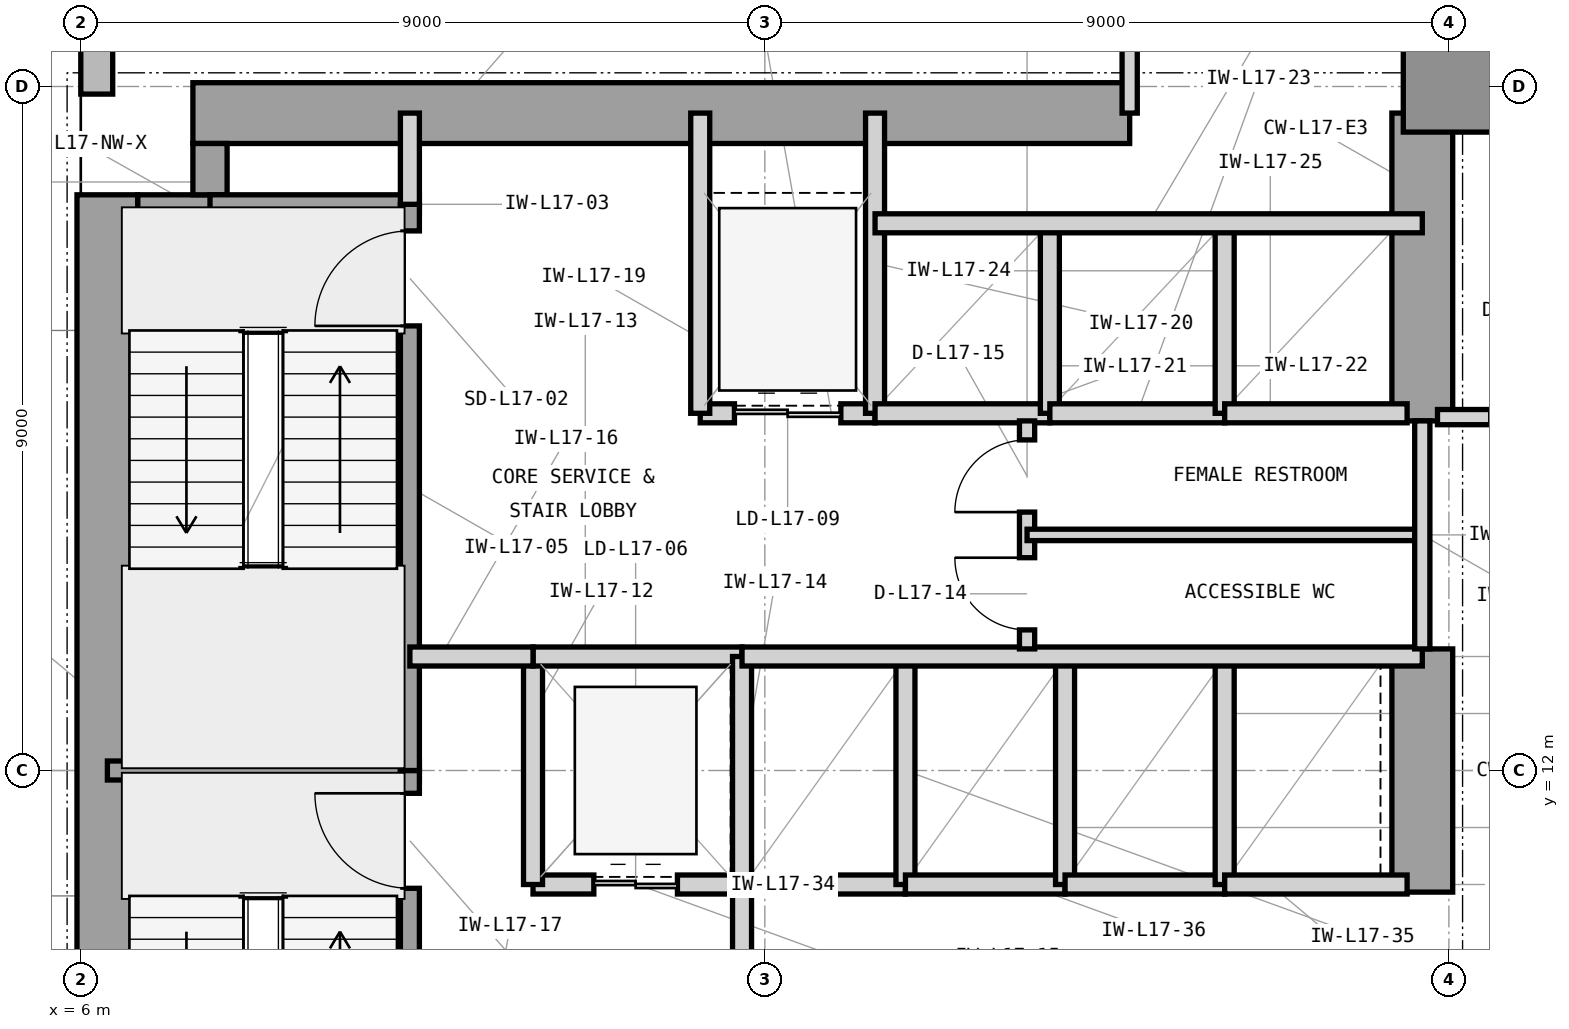
"""IFC4 building model, lengths in metres.
Left out: names, types, materials, properties, quantities, classifications, styles, units other than length and angle.
Written with IfcOpenShell. Run it as: python <this file> out.ifc"""

import sys

from ifc_helpers import new_model, si_unit, direction, frame, frame_2d, origin, origin_2d, place, context, subcontext, project, spatial, rectangle, extrude, element, fill, save


model = new_model("IFC4")
c1 = context("Model", 3, precision=1e-05, world=origin(), true_north=direction((0.0, 1.0)))
c2 = subcontext(c1, "Body", "Model", "MODEL_VIEW")
j1 = project(units=[si_unit("LENGTHUNIT", "METRE"), si_unit("PLANEANGLEUNIT", "RADIAN")], contexts=[c1])
p1 = place(None, origin())
s1 = spatial("IfcSite", under=j1, at=p1, CompositionType="ELEMENT")
p2 = place(p1, origin())
s2 = spatial("IfcBuilding", under=s1, at=p2, CompositionType="ELEMENT")
p3 = place(p2, frame((0.0, 0.0, 76.2)))
s3 = spatial("IfcBuildingStorey", under=s2, at=p3, CompositionType="ELEMENT", Elevation=76.2)
p4 = place(p3, frame((6.35, 4.425, 0.0), z_axis=(0.0, 0.0, 1.0), x_axis=(0.0, 1.0, 0.0)))
e1 = element("IfcWall", 1, at=p4, inside=s3, PredefinedType="SHEAR", context=c2, shape_type="SweptSolid", body=[
    extrude(rectangle(XDim=15.15, YDim=0.8, at=frame_2d((7.575, 0.0))), origin(), (0.0, 0.0, 1.0), 4.2),
])
p5 = place(p3, frame((7.475, 20.65, 0.0), z_axis=(0.0, 0.0, 1.0), x_axis=(1.0, 0.0, 0.0)))
e2 = element("IfcWall", 2, at=p5, inside=s3, PredefinedType="SHEAR", context=c2, shape_type="SweptSolid", body=[
    extrude(rectangle(XDim=12.325, YDim=0.8, at=frame_2d((6.163, 0.0))), origin(), (0.0, 0.0, 1.0), 4.2),
])
p6 = place(p3, frame((23.65, 10.4, 0.0), z_axis=(0.0, 0.0, 1.0), x_axis=(0.0, 1.0, 0.0)))
e3 = element("IfcWall", 3, at=p6, inside=s3, PredefinedType="SHEAR", context=c2, shape_type="SweptSolid", body=[
    extrude(rectangle(XDim=3.2, YDim=0.8, at=frame_2d((1.6, 0.0))), origin(), (0.0, 0.0, 1.0), 4.2),
])
p7 = place(p3, frame((23.65, 16.6, 0.0), z_axis=(0.0, 0.0, 1.0), x_axis=(0.0, 1.0, 0.0)))
e4 = element("IfcWall", 4, at=p7, inside=s3, PredefinedType="SHEAR", context=c2, shape_type="SweptSolid", body=[
    extrude(rectangle(XDim=4.05, YDim=0.8, at=frame_2d((2.025, 0.0))), origin(), (0.0, 0.0, 1.0), 4.2),
])
p8 = place(p3, frame((6.75, 19.35, 0.0), z_axis=(0.0, 0.0, 1.0), x_axis=(1.0, 0.0, 0.0)))
e5 = element("IfcWall", 5, at=p8, inside=s3, PredefinedType="SHEAR", context=c2, shape_type="SweptSolid", body=[
    extrude(rectangle(XDim=1.175, YDim=0.45, at=frame_2d((0.587, 0.0))), origin(), (0.0, 0.0, 1.0), 4.2),
])
p9 = place(p3, frame((7.7, 19.575, 0.0), z_axis=(0.0, 0.0, 1.0), x_axis=(0.0, 1.0, 0.0)))
e6 = element("IfcWall", 6, at=p9, inside=s3, PredefinedType="SHEAR", context=c2, shape_type="SweptSolid", body=[
    extrude(rectangle(XDim=0.675, YDim=0.45, at=frame_2d((0.337, 0.0))), origin(), (0.0, 0.0, 1.0), 4.2),
])
p10 = place(p3, frame((24.0, 21.0, 0.0), z_axis=(0.0, 0.0, 1.0), x_axis=(1.0, 0.0, 0.0)))
e7 = element("IfcColumn", 7, at=p10, inside=s3, PredefinedType="COLUMN", context=c2, shape_type="SweptSolid", body=[
    extrude(rectangle(XDim=1.2, YDim=1.2, at=origin_2d()), origin(), (0.0, 0.0, 1.0), 4.2),
])
p11 = place(p3, frame((23.79, 21.0, 0.0), z_axis=(0.0, 0.0, 1.0), x_axis=(0.0, 1.0, 0.0)))
e8 = element("IfcWall", 8, at=p11, inside=s3, PredefinedType="STANDARD", context=c2, shape_type="SweptSolid", body=[
    extrude(rectangle(XDim=28.4, YDim=0.42, at=frame_2d((14.2, 0.0))), origin(), (0.0, 0.0, 1.0), 3.98),
])
p12 = place(p11, frame((10.433, 0.0, 0.85)))
e9 = element("IfcOpeningElement", 9, at=p12, cuts=e8, PredefinedType="OPENING", context=c2, shape_type="SweptSolid", body=[
    extrude(rectangle(XDim=2.8, YDim=2.45, at=frame_2d((1.4, 1.225))), frame((0.0, 0.22, 0.0), z_axis=(0.0, -1.0, 0.0), x_axis=(1.0, 0.0, 0.0)), (0.0, 0.0, 1.0), 0.44),
])
p13 = place(p11, frame((21.966, 0.0, 0.85)))
e10 = element("IfcOpeningElement", 10, at=p13, cuts=e8, PredefinedType="OPENING", context=c2, shape_type="SweptSolid", body=[
    extrude(rectangle(XDim=1.2, YDim=2.45, at=frame_2d((0.6, 1.225))), frame((0.0, 0.22, 0.0), z_axis=(0.0, -1.0, 0.0), x_axis=(1.0, 0.0, 0.0)), (0.0, 0.0, 1.0), 0.44),
])
p14 = place(p3, frame((6.21, 49.4, 0.0), z_axis=(0.0, 0.0, 1.0), x_axis=(0.0, -1.0, 0.0)))
e11 = element("IfcWall", 11, at=p14, inside=s3, PredefinedType="STANDARD", context=c2, shape_type="SweptSolid", body=[
    extrude(rectangle(XDim=28.5, YDim=0.42, at=frame_2d((14.25, 0.0))), origin(), (0.0, 0.0, 1.0), 3.98),
])
p15 = place(p14, frame((15.225, 0.0, 0.85)))
e12 = element("IfcOpeningElement", 12, at=p15, cuts=e11, PredefinedType="OPENING", context=c2, shape_type="SweptSolid", body=[
    extrude(rectangle(XDim=2.8, YDim=2.45, at=frame_2d((1.4, 1.225))), frame((0.0, 0.22, 0.0), z_axis=(0.0, -1.0, 0.0), x_axis=(1.0, 0.0, 0.0)), (0.0, 0.0, 1.0), 0.44),
])
p16 = place(p14, frame((5.236, 0.0, 0.85)))
e13 = element("IfcOpeningElement", 13, at=p16, cuts=e11, PredefinedType="OPENING", context=c2, shape_type="SweptSolid", body=[
    extrude(rectangle(XDim=1.2, YDim=2.45, at=frame_2d((0.6, 1.225))), frame((0.0, 0.22, 0.0), z_axis=(0.0, -1.0, 0.0), x_axis=(1.0, 0.0, 0.0)), (0.0, 0.0, 1.0), 0.44),
])
p17 = place(p3, frame((6.35, 12.0, 0.0), z_axis=(0.0, 0.0, 1.0), x_axis=(1.0, 0.0, 0.0)))
e14 = element("IfcWall", 14, at=p17, inside=s3, PredefinedType="SHEAR", context=c2, shape_type="SweptSolid", body=[
    extrude(rectangle(XDim=4.105, YDim=0.25, at=frame_2d((2.052, 0.0))), origin(), (0.0, 0.0, 1.0), 4.2),
])
p18 = place(p3, frame((7.7, 19.45, 0.0), z_axis=(0.0, 0.0, 1.0), x_axis=(1.0, 0.0, 0.0)))
e15 = element("IfcWall", 15, at=p18, inside=s3, PredefinedType="SHEAR", context=c2, shape_type="SweptSolid", body=[
    extrude(rectangle(XDim=2.755, YDim=0.25, at=frame_2d((1.377, 0.0))), origin(), (0.0, 0.0, 1.0), 4.2),
])
p19 = place(p3, frame((10.33, 4.55, 0.0), z_axis=(0.0, 0.0, 1.0), x_axis=(0.0, 1.0, 0.0)))
e16 = element("IfcWall", 16, at=p19, inside=s3, PredefinedType="SHEAR", context=c2, shape_type="SweptSolid", body=[
    extrude(rectangle(XDim=7.45, YDim=0.25, at=frame_2d((3.725, 0.0))), origin(), (0.0, 0.0, 1.0), 4.2),
])
p20 = place(p19, frame((5.9, 0.0, 0.0)))
e17 = element("IfcOpeningElement", 17, at=p20, cuts=e16, PredefinedType="OPENING", context=c2, shape_type="SweptSolid", body=[
    extrude(rectangle(XDim=1.25, YDim=2.2, at=frame_2d((0.625, 1.1))), frame((0.0, 0.135, 0.0), z_axis=(0.0, -1.0, 0.0), x_axis=(1.0, 0.0, 0.0)), (0.0, 0.0, 1.0), 0.27),
])
p21 = place(p3, frame((10.33, 12.0, 0.0), z_axis=(0.0, 0.0, 1.0), x_axis=(0.0, 1.0, 0.0)))
e18 = element("IfcWall", 18, at=p21, inside=s3, PredefinedType="SHEAR", context=c2, shape_type="SweptSolid", body=[
    extrude(rectangle(XDim=7.45, YDim=0.25, at=frame_2d((3.725, 0.0))), origin(), (0.0, 0.0, 1.0), 4.2),
])
p22 = place(p21, frame((5.85, 0.0, 0.0)))
e19 = element("IfcOpeningElement", 19, at=p22, cuts=e18, PredefinedType="OPENING", context=c2, shape_type="SweptSolid", body=[
    extrude(rectangle(XDim=1.25, YDim=2.2, at=frame_2d((0.625, 1.1))), frame((0.0, 0.135, 0.0), z_axis=(0.0, -1.0, 0.0), x_axis=(1.0, 0.0, 0.0)), (0.0, 0.0, 1.0), 0.27),
])
p23 = place(p3, frame((10.33, 19.45, 0.0), z_axis=(0.0, 0.0, 1.0), x_axis=(0.0, 1.0, 0.0)))
e20 = element("IfcWall", 20, at=p23, inside=s3, PredefinedType="PARTITIONING", context=c2, shape_type="SweptSolid", body=[
    extrude(rectangle(XDim=1.2, YDim=0.25, at=frame_2d((0.6, 0.0))), origin(), (0.0, 0.0, 1.0), 3.114),
])
p24 = place(p3, frame((11.95, 10.5, 0.0), z_axis=(0.0, 0.0, 1.0), x_axis=(1.0, 0.0, 0.0)))
e21 = element("IfcWall", 21, at=p24, inside=s3, PredefinedType="PARTITIONING", context=c2, shape_type="SweptSolid", body=[
    extrude(rectangle(XDim=2.75, YDim=0.25, at=frame_2d((1.375, 0.0))), origin(), (0.0, 0.0, 1.0), 3.426),
])
p25 = place(p24, frame((0.8, 0.0, 0.0)))
e22 = element("IfcOpeningElement", 22, at=p25, cuts=e21, PredefinedType="OPENING", context=c2, shape_type="SweptSolid", body=[
    extrude(rectangle(XDim=1.1, YDim=2.25, at=frame_2d((0.55, 1.125))), frame((0.0, 0.135, 0.0), z_axis=(0.0, -1.0, 0.0), x_axis=(1.0, 0.0, 0.0)), (0.0, 0.0, 1.0), 0.27),
])
p26 = place(p3, frame((11.95, 10.5, 0.0), z_axis=(0.0, 0.0, 1.0), x_axis=(0.0, 1.0, 0.0)))
e23 = element("IfcWall", 23, at=p26, inside=s3, PredefinedType="PARTITIONING", context=c2, shape_type="SweptSolid", body=[
    extrude(rectangle(XDim=3.0, YDim=0.25, at=frame_2d((1.5, 0.0))), origin(), (0.0, 0.0, 1.0), 3.97),
])
p27 = place(p3, frame((11.95, 13.5, 0.0), z_axis=(0.0, 0.0, 1.0), x_axis=(1.0, 0.0, 0.0)))
e24 = element("IfcWall", 24, at=p27, inside=s3, PredefinedType="PARTITIONING", context=c2, shape_type="SweptSolid", body=[
    extrude(rectangle(XDim=2.75, YDim=0.25, at=frame_2d((1.375, 0.0))), origin(), (0.0, 0.0, 1.0), 3.426),
])
p28 = place(p3, frame((14.7, 10.5, 0.0), z_axis=(0.0, 0.0, 1.0), x_axis=(0.0, 1.0, 0.0)))
e25 = element("IfcWall", 25, at=p28, inside=s3, PredefinedType="PARTITIONING", context=c2, shape_type="SweptSolid", body=[
    extrude(rectangle(XDim=3.0, YDim=0.25, at=frame_2d((1.5, 0.0))), origin(), (0.0, 0.0, 1.0), 3.97),
])
p29 = place(p3, frame((14.7, 6.7, 0.0), z_axis=(0.0, 0.0, 1.0), x_axis=(0.0, 1.0, 0.0)))
e26 = element("IfcWall", 26, at=p29, inside=s3, PredefinedType="PARTITIONING", context=c2, shape_type="SweptSolid", body=[
    extrude(rectangle(XDim=3.8, YDim=0.25, at=frame_2d((1.9, 0.0))), origin(), (0.0, 0.0, 1.0), 3.97),
])
p30 = place(p29, frame((1.3, 0.0, 0.0)))
e27 = element("IfcOpeningElement", 27, at=p30, cuts=e26, PredefinedType="OPENING", context=c2, shape_type="SweptSolid", body=[
    extrude(rectangle(XDim=1.2, YDim=2.2, at=frame_2d((0.6, 1.1))), frame((0.0, 0.135, 0.0), z_axis=(0.0, -1.0, 0.0), x_axis=(1.0, 0.0, 0.0)), (0.0, 0.0, 1.0), 0.27),
])
p31 = place(p3, frame((10.33, 13.5, 0.0), z_axis=(0.0, 0.0, 1.0), x_axis=(1.0, 0.0, 0.0)))
e28 = element("IfcWall", 28, at=p31, inside=s3, PredefinedType="PARTITIONING", context=c2, shape_type="SweptSolid", body=[
    extrude(rectangle(XDim=1.62, YDim=0.25, at=frame_2d((0.81, 0.0))), origin(), (0.0, 0.0, 1.0), 3.426),
])
p32 = place(p3, frame((14.15, 16.7, 0.0), z_axis=(0.0, 0.0, 1.0), x_axis=(1.0, 0.0, 0.0)))
e29 = element("IfcWall", 29, at=p32, inside=s3, PredefinedType="PARTITIONING", context=c2, shape_type="SweptSolid", body=[
    extrude(rectangle(XDim=2.3, YDim=0.25, at=frame_2d((1.15, 0.0))), origin(), (0.0, 0.0, 1.0), 3.426),
])
p33 = place(p32, frame((0.45, 0.0, 0.0)))
e30 = element("IfcOpeningElement", 30, at=p33, cuts=e29, PredefinedType="OPENING", context=c2, shape_type="SweptSolid", body=[
    extrude(rectangle(XDim=1.4, YDim=2.35, at=frame_2d((0.7, 1.175))), frame((0.0, 0.135, 0.0), z_axis=(0.0, -1.0, 0.0), x_axis=(1.0, 0.0, 0.0)), (0.0, 0.0, 1.0), 0.27),
])
for number, where, z_axis, x_axis in (
    (31, (14.15, 16.7, 0.0), (0.0, 0.0, 1.0), (0.0, 1.0, 0.0)),
    (32, (16.45, 16.7, 0.0), (0.0, 0.0, 1.0), (0.0, 1.0, 0.0)),
):
    element("IfcWall", number, at=place(p3, frame(where, z_axis=z_axis, x_axis=x_axis)), inside=s3, PredefinedType="PARTITIONING", context=c2, shape_type="SweptSolid", body=[
        extrude(rectangle(XDim=3.95, YDim=0.25, at=frame_2d((1.975, 0.0))), origin(), (0.0, 0.0, 1.0), 3.97),
    ])
p34 = place(p3, frame((16.45, 16.7, 0.0), z_axis=(0.0, 0.0, 1.0), x_axis=(1.0, 0.0, 0.0)))
e33 = element("IfcWall", 33, at=p34, inside=s3, PredefinedType="PARTITIONING", context=c2, shape_type="SweptSolid", body=[
    extrude(rectangle(XDim=2.3, YDim=0.25, at=frame_2d((1.15, 0.0))), origin(), (0.0, 0.0, 1.0), 3.426),
])
p35 = place(p3, frame((18.75, 16.7, 0.0), z_axis=(0.0, 0.0, 1.0), x_axis=(0.0, 1.0, 0.0)))
e34 = element("IfcWall", 34, at=p35, inside=s3, PredefinedType="PARTITIONING", context=c2, shape_type="SweptSolid", body=[
    extrude(rectangle(XDim=2.5, YDim=0.25, at=frame_2d((1.25, 0.0))), origin(), (0.0, 0.0, 1.0), 3.97),
])
p36 = place(p3, frame((18.75, 16.7, 0.0), z_axis=(0.0, 0.0, 1.0), x_axis=(1.0, 0.0, 0.0)))
e35 = element("IfcWall", 35, at=p36, inside=s3, PredefinedType="PARTITIONING", context=c2, shape_type="SweptSolid", body=[
    extrude(rectangle(XDim=2.3, YDim=0.25, at=frame_2d((1.15, 0.0))), origin(), (0.0, 0.0, 1.0), 3.426),
])
p37 = place(p3, frame((21.05, 16.7, 0.0), z_axis=(0.0, 0.0, 1.0), x_axis=(0.0, 1.0, 0.0)))
e36 = element("IfcWall", 36, at=p37, inside=s3, PredefinedType="PARTITIONING", context=c2, shape_type="SweptSolid", body=[
    extrude(rectangle(XDim=2.5, YDim=0.25, at=frame_2d((1.25, 0.0))), origin(), (0.0, 0.0, 1.0), 3.97),
])
p38 = place(p3, frame((21.05, 16.7, 0.0), z_axis=(0.0, 0.0, 1.0), x_axis=(1.0, 0.0, 0.0)))
e37 = element("IfcWall", 37, at=p38, inside=s3, PredefinedType="PARTITIONING", context=c2, shape_type="SweptSolid", body=[
    extrude(rectangle(XDim=2.4, YDim=0.25, at=frame_2d((1.2, 0.0))), origin(), (0.0, 0.0, 1.0), 3.426),
])
p39 = place(p3, frame((16.45, 19.2, 0.0), z_axis=(0.0, 0.0, 1.0), x_axis=(1.0, 0.0, 0.0)))
e38 = element("IfcWall", 38, at=p39, inside=s3, PredefinedType="PARTITIONING", context=c2, shape_type="SweptSolid", body=[
    extrude(rectangle(XDim=7.2, YDim=0.25, at=frame_2d((3.6, 0.0))), origin(), (0.0, 0.0, 1.0), 3.97),
])
p40 = place(p3, frame((14.7, 10.5, 0.0), z_axis=(0.0, 0.0, 1.0), x_axis=(1.0, 0.0, 0.0)))
e39 = element("IfcWall", 39, at=p40, inside=s3, PredefinedType="PARTITIONING", context=c2, shape_type="SweptSolid", body=[
    extrude(rectangle(XDim=2.15, YDim=0.25, at=frame_2d((1.075, 0.0))), origin(), (0.0, 0.0, 1.0), 3.426),
])
p41 = place(p3, frame((16.85, 10.5, 0.0), z_axis=(0.0, 0.0, 1.0), x_axis=(0.0, 1.0, 0.0)))
e40 = element("IfcWall", 40, at=p41, inside=s3, PredefinedType="PARTITIONING", context=c2, shape_type="SweptSolid", body=[
    extrude(rectangle(XDim=3.0, YDim=0.25, at=frame_2d((1.5, 0.0))), origin(), (0.0, 0.0, 1.0), 3.97),
])
p42 = place(p3, frame((16.85, 10.5, 0.0), z_axis=(0.0, 0.0, 1.0), x_axis=(1.0, 0.0, 0.0)))
e41 = element("IfcWall", 41, at=p42, inside=s3, PredefinedType="PARTITIONING", context=c2, shape_type="SweptSolid", body=[
    extrude(rectangle(XDim=2.1, YDim=0.25, at=frame_2d((1.05, 0.0))), origin(), (0.0, 0.0, 1.0), 3.426),
])
p43 = place(p3, frame((18.95, 10.5, 0.0), z_axis=(0.0, 0.0, 1.0), x_axis=(0.0, 1.0, 0.0)))
e42 = element("IfcWall", 42, at=p43, inside=s3, PredefinedType="PARTITIONING", context=c2, shape_type="SweptSolid", body=[
    extrude(rectangle(XDim=3.0, YDim=0.25, at=frame_2d((1.5, 0.0))), origin(), (0.0, 0.0, 1.0), 3.97),
])
p44 = place(p3, frame((18.95, 10.5, 0.0), z_axis=(0.0, 0.0, 1.0), x_axis=(1.0, 0.0, 0.0)))
e43 = element("IfcWall", 43, at=p44, inside=s3, PredefinedType="PARTITIONING", context=c2, shape_type="SweptSolid", body=[
    extrude(rectangle(XDim=2.1, YDim=0.25, at=frame_2d((1.05, 0.0))), origin(), (0.0, 0.0, 1.0), 3.426),
])
p45 = place(p3, frame((21.05, 10.5, 0.0), z_axis=(0.0, 0.0, 1.0), x_axis=(0.0, 1.0, 0.0)))
e44 = element("IfcWall", 44, at=p45, inside=s3, PredefinedType="PARTITIONING", context=c2, shape_type="SweptSolid", body=[
    extrude(rectangle(XDim=3.0, YDim=0.25, at=frame_2d((1.5, 0.0))), origin(), (0.0, 0.0, 1.0), 3.97),
])
p46 = place(p3, frame((21.05, 10.5, 0.0), z_axis=(0.0, 0.0, 1.0), x_axis=(1.0, 0.0, 0.0)))
e45 = element("IfcWall", 45, at=p46, inside=s3, PredefinedType="PARTITIONING", context=c2, shape_type="SweptSolid", body=[
    extrude(rectangle(XDim=2.4, YDim=0.25, at=frame_2d((1.2, 0.0))), origin(), (0.0, 0.0, 1.0), 3.426),
])
p47 = place(p3, frame((14.7, 13.5, 0.0), z_axis=(0.0, 0.0, 1.0), x_axis=(1.0, 0.0, 0.0)))
e46 = element("IfcWall", 46, at=p47, inside=s3, PredefinedType="PARTITIONING", context=c2, shape_type="SweptSolid", body=[
    extrude(rectangle(XDim=8.95, YDim=0.25, at=frame_2d((4.475, 0.0))), origin(), (0.0, 0.0, 1.0), 3.426),
])
p48 = place(p3, frame((18.45, 13.6, 0.0), z_axis=(0.0, 0.0, 1.0), x_axis=(0.0, 1.0, 0.0)))
e47 = element("IfcWall", 47, at=p48, inside=s3, PredefinedType="PARTITIONING", context=c2, shape_type="SweptSolid", body=[
    extrude(rectangle(XDim=3.0, YDim=0.2, at=frame_2d((1.5, 0.0))), origin(), (0.0, 0.0, 1.0), 3.97),
])
p49 = place(p48, frame((0.25, 0.0, 0.0)))
e48 = element("IfcOpeningElement", 48, at=p49, cuts=e47, PredefinedType="OPENING", context=c2, shape_type="SweptSolid", body=[
    extrude(rectangle(XDim=0.95, YDim=2.1, at=frame_2d((0.475, 1.05))), frame((0.0, 0.11, 0.0), z_axis=(0.0, -1.0, 0.0), x_axis=(1.0, 0.0, 0.0)), (0.0, 0.0, 1.0), 0.22),
])
p50 = place(p48, frame((1.8, 0.0, 0.0)))
e49 = element("IfcOpeningElement", 49, at=p50, cuts=e47, PredefinedType="OPENING", context=c2, shape_type="SweptSolid", body=[
    extrude(rectangle(XDim=0.95, YDim=2.1, at=frame_2d((0.475, 1.05))), frame((0.0, 0.11, 0.0), z_axis=(0.0, -1.0, 0.0), x_axis=(1.0, 0.0, 0.0)), (0.0, 0.0, 1.0), 0.22),
])
p51 = place(p3, frame((18.45, 15.1, 0.0), z_axis=(0.0, 0.0, 1.0), x_axis=(1.0, 0.0, 0.0)))
e50 = element("IfcWall", 50, at=p51, inside=s3, PredefinedType="PARTITIONING", context=c2, shape_type="SweptSolid", body=[
    extrude(rectangle(XDim=5.2, YDim=0.15, at=frame_2d((2.6, 0.0))), origin(), (0.0, 0.0, 1.0), 3.97),
])
p52 = place(p3, frame((23.65, 13.6, 0.0), z_axis=(0.0, 0.0, 1.0), x_axis=(0.0, 1.0, 0.0)))
e51 = element("IfcWall", 51, at=p52, inside=s3, PredefinedType="PARTITIONING", context=c2, shape_type="SweptSolid", body=[
    extrude(rectangle(XDim=3.0, YDim=0.2, at=frame_2d((1.5, 0.0))), origin(), (0.0, 0.0, 1.0), 3.97),
])
p53 = place(p3, frame((23.85, 16.65, 0.0), z_axis=(0.0, 0.0, 1.0), x_axis=(1.0, 0.0, 0.0)))
e52 = element("IfcWall", 52, at=p53, inside=s3, PredefinedType="PARTITIONING", context=c2, shape_type="SweptSolid", body=[
    extrude(rectangle(XDim=2.85, YDim=0.2, at=frame_2d((1.425, 0.0))), origin(), (0.0, 0.0, 1.0), 3.97),
])
p54 = place(p53, frame((0.7, 0.0, 0.0)))
e53 = element("IfcOpeningElement", 53, at=p54, cuts=e52, PredefinedType="OPENING", context=c2, shape_type="SweptSolid", body=[
    extrude(rectangle(XDim=1.0, YDim=2.15, at=frame_2d((0.5, 1.075))), frame((0.0, 0.11, 0.0), z_axis=(0.0, -1.0, 0.0), x_axis=(1.0, 0.0, 0.0)), (0.0, 0.0, 1.0), 0.22),
])
p55 = place(p3, frame((19.8, 20.65, 0.0), z_axis=(0.0, 0.0, 1.0), x_axis=(0.0, 1.0, 0.0)))
e54 = element("IfcWall", 54, at=p55, inside=s3, PredefinedType="PARTITIONING", context=c2, shape_type="SweptSolid", body=[
    extrude(rectangle(XDim=6.15, YDim=0.2, at=frame_2d((3.075, 0.0))), origin(), (0.0, 0.0, 1.0), 3.97),
])
p56 = place(p20, origin())
e55 = element("IfcDoor", 55, at=p56, inside=s3, OperationType="SINGLE_SWING_RIGHT", PredefinedType="DOOR", context=c2, shape_type="SweptSolid", body=[
    extrude(rectangle(XDim=1.25, YDim=2.2, at=frame_2d((0.625, 1.1))), frame((0.0, 0.025, 0.0), z_axis=(0.0, -1.0, 0.0), x_axis=(1.0, 0.0, 0.0)), (0.0, 0.0, 1.0), 0.05),
])
fill(e17, e55)
p57 = place(p22, origin())
e56 = element("IfcDoor", 56, at=p57, inside=s3, OperationType="SINGLE_SWING_LEFT", PredefinedType="DOOR", context=c2, shape_type="SweptSolid", body=[
    extrude(rectangle(XDim=1.25, YDim=2.2, at=frame_2d((0.625, 1.1))), frame((0.0, 0.025, 0.0), z_axis=(0.0, -1.0, 0.0), x_axis=(1.0, 0.0, 0.0)), (0.0, 0.0, 1.0), 0.05),
])
fill(e19, e56)
p58 = place(p25, origin())
e57 = element("IfcDoor", 57, at=p58, inside=s3, OperationType="DOUBLE_DOOR_SLIDING", PredefinedType="DOOR", context=c2, shape_type="SweptSolid", body=[
    extrude(rectangle(XDim=1.1, YDim=2.25, at=frame_2d((0.55, 1.125))), frame((0.0, 0.025, 0.0), z_axis=(0.0, -1.0, 0.0), x_axis=(1.0, 0.0, 0.0)), (0.0, 0.0, 1.0), 0.05),
])
fill(e22, e57)
p59 = place(p33, origin())
e58 = element("IfcDoor", 58, at=p59, inside=s3, OperationType="DOUBLE_DOOR_SLIDING", PredefinedType="DOOR", context=c2, shape_type="SweptSolid", body=[
    extrude(rectangle(XDim=1.4, YDim=2.35, at=frame_2d((0.7, 1.175))), frame((0.0, 0.025, 0.0), z_axis=(0.0, -1.0, 0.0), x_axis=(1.0, 0.0, 0.0)), (0.0, 0.0, 1.0), 0.05),
])
fill(e30, e58)
p60 = place(p49, origin())
e59 = element("IfcDoor", 59, at=p60, inside=s3, OperationType="SINGLE_SWING_RIGHT", PredefinedType="DOOR", context=c2, shape_type="SweptSolid", body=[
    extrude(rectangle(XDim=0.95, YDim=2.1, at=frame_2d((0.475, 1.05))), frame((0.0, 0.025, 0.0), z_axis=(0.0, -1.0, 0.0), x_axis=(1.0, 0.0, 0.0)), (0.0, 0.0, 1.0), 0.05),
])
fill(e48, e59)
p61 = place(p50, origin())
e60 = element("IfcDoor", 60, at=p61, inside=s3, OperationType="SINGLE_SWING_LEFT", PredefinedType="DOOR", context=c2, shape_type="SweptSolid", body=[
    extrude(rectangle(XDim=0.95, YDim=2.1, at=frame_2d((0.475, 1.05))), frame((0.0, 0.025, 0.0), z_axis=(0.0, -1.0, 0.0), x_axis=(1.0, 0.0, 0.0)), (0.0, 0.0, 1.0), 0.05),
])
fill(e49, e60)
save(model, sys.argv[1])
